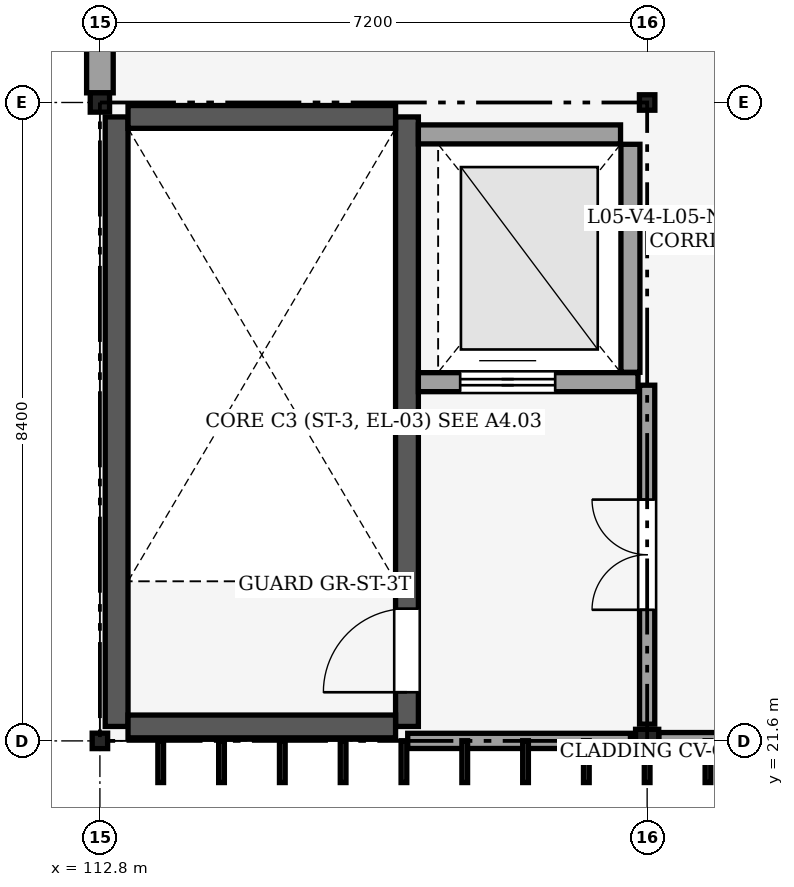
"""IFC4 building model, lengths in metres.
Left out: names, types, materials, properties, quantities, classifications, styles, units other than length and angle.
Written with IfcOpenShell. Run it as: python <this file> out.ifc"""

import sys

from ifc_helpers import new_model, si_unit, direction, frame, frame_2d, origin, origin_2d, place, context, subcontext, project, spatial, rectangle, hollow_rectangle, extrude, element, fill, save


model = new_model("IFC4")
c1 = context("Model", 3, precision=1e-05, world=origin(), true_north=direction((0.0, 1.0)))
c2 = subcontext(c1, "Body", "Model", "MODEL_VIEW")
j1 = project(units=[si_unit("LENGTHUNIT", "METRE"), si_unit("PLANEANGLEUNIT", "RADIAN")], contexts=[c1])
p1 = place(None, origin())
s1 = spatial("IfcSite", under=j1, at=p1, CompositionType="ELEMENT")
p2 = place(p1, origin())
s2 = spatial("IfcBuilding", under=s1, at=p2, CompositionType="ELEMENT")
p3 = place(p2, frame((0.0, 0.0, 24.6)))
s3 = spatial("IfcBuildingStorey", under=s2, at=p3, CompositionType="ELEMENT", Elevation=24.6)
p4 = place(p3, frame((112.8, 21.6, 0.0), z_axis=(0.0, 0.0, 1.0), x_axis=(1.0, 0.0, 0.0)))
e1 = element("IfcColumn", 1, at=p4, inside=s3, PredefinedType="COLUMN", context=c2, shape_type="SweptSolid", body=[
    extrude(hollow_rectangle(XDim=0.203, YDim=0.203, WallThickness=0.013, OuterFilletRadius=0.025, at=origin_2d()), origin(), (0.0, 0.0, 1.0), 4.8),
])
p5 = place(p3, frame((112.8, 30.0, 0.0), z_axis=(0.0, 0.0, 1.0), x_axis=(1.0, 0.0, 0.0)))
e2 = element("IfcColumn", 2, at=p5, inside=s3, PredefinedType="COLUMN", context=c2, shape_type="SweptSolid", body=[
    extrude(hollow_rectangle(XDim=0.254, YDim=0.254, WallThickness=0.013, OuterFilletRadius=0.025, at=origin_2d()), origin(), (0.0, 0.0, 1.0), 4.8),
])
p6 = place(p3, frame((120.0, 21.6, 0.0), z_axis=(0.0, 0.0, 1.0), x_axis=(1.0, 0.0, 0.0)))
e3 = element("IfcColumn", 3, at=p6, inside=s3, PredefinedType="COLUMN", context=c2, shape_type="SweptSolid", body=[
    extrude(hollow_rectangle(XDim=0.305, YDim=0.305, WallThickness=0.016, OuterFilletRadius=0.032, at=origin_2d()), origin(), (0.0, 0.0, 1.0), 4.8),
])
p7 = place(p3, frame((120.0, 30.0, 0.0), z_axis=(0.0, 0.0, 1.0), x_axis=(1.0, 0.0, 0.0)))
e4 = element("IfcColumn", 4, at=p7, inside=s3, PredefinedType="COLUMN", context=c2, shape_type="SweptSolid", body=[
    extrude(hollow_rectangle(XDim=0.203, YDim=0.203, WallThickness=0.013, OuterFilletRadius=0.025, at=origin_2d()), origin(), (0.0, 0.0, 1.0), 4.8),
])
p8 = place(p3, frame((127.098, 21.6, 0.0), z_axis=(0.0, 0.0, 1.0), x_axis=(-1.0, 0.0, 0.0)))
e5 = element("IfcWall", 5, at=p8, inside=s3, PredefinedType="SOLIDWALL", context=c2, shape_type="SweptSolid", body=[
    extrude(rectangle(XDim=6.946, YDim=0.22, at=frame_2d((3.473, 0.0))), origin(), (0.0, 0.0, 1.0), 3.695),
])
p9 = place(p8, frame((2.423, 0.0, 0.9)))
e6 = element("IfcOpeningElement", 6, at=p9, cuts=e5, PredefinedType="OPENING", context=c2, shape_type="SweptSolid", body=[
    extrude(rectangle(XDim=2.1, YDim=0.9, at=frame_2d((1.05, 0.45))), frame((0.0, 0.12, 0.0), z_axis=(0.0, -1.0, 0.0), x_axis=(1.0, 0.0, 0.0)), (0.0, 0.0, 1.0), 0.24),
])
p10 = place(p3, frame((112.8, 30.127, 0.0), z_axis=(0.0, 0.0, 1.0), x_axis=(0.0, 1.0, 0.0)))
e7 = element("IfcWall", 7, at=p10, inside=s3, PredefinedType="SOLIDWALL", context=c2, shape_type="SweptSolid", body=[
    extrude(rectangle(XDim=8.121, YDim=0.35, at=frame_2d((4.06, 0.0))), origin(), (0.0, 0.0, 1.0), 4.6),
])
p11 = place(p10, frame((0.75, 0.0, 0.9)))
e8 = element("IfcOpeningElement", 8, at=p11, cuts=e7, PredefinedType="OPENING", context=c2, shape_type="SweptSolid", body=[
    extrude(rectangle(XDim=1.2, YDim=1.5, at=frame_2d((0.6, 0.75))), frame((0.0, 0.185, 0.0), z_axis=(0.0, -1.0, 0.0), x_axis=(1.0, 0.0, 0.0)), (0.0, 0.0, 1.0), 0.371),
])
p12 = place(p3, frame((113.02, 21.79, 0.0), z_axis=(0.0, 0.0, 1.0), x_axis=(0.0, 1.0, 0.0)))
e9 = element("IfcWall", 9, at=p12, inside=s3, PredefinedType="SHEAR", context=c2, shape_type="SweptSolid", body=[
    extrude(rectangle(XDim=8.02, YDim=0.3, at=frame_2d((4.01, 0.0))), origin(), (0.0, 0.0, 1.0), 4.6),
])
p13 = place(p3, frame((116.84, 21.79, 0.0), z_axis=(0.0, 0.0, 1.0), x_axis=(0.0, 1.0, 0.0)))
e10 = element("IfcWall", 10, at=p13, inside=s3, PredefinedType="SHEAR", context=c2, shape_type="SweptSolid", body=[
    extrude(rectangle(XDim=8.02, YDim=0.3, at=frame_2d((4.01, 0.0))), origin(), (0.0, 0.0, 1.0), 4.6),
])
p14 = place(p13, frame((0.45, 0.0, 0.0)))
e11 = element("IfcOpeningElement", 11, at=p14, cuts=e10, PredefinedType="OPENING", context=c2, shape_type="SweptSolid", body=[
    extrude(rectangle(XDim=1.1, YDim=2.15, at=frame_2d((0.55, 1.075))), frame((0.0, 0.16, 0.0), z_axis=(0.0, -1.0, 0.0), x_axis=(1.0, 0.0, 0.0)), (0.0, 0.0, 1.0), 0.321),
])
for number, where, z_axis, x_axis in (
    (12, (113.17, 21.79, 0.0), (0.0, 0.0, 1.0), (1.0, 0.0, 0.0)),
    (13, (113.17, 29.81, 0.0), (0.0, 0.0, 1.0), (1.0, 0.0, 0.0)),
):
    element("IfcWall", number, at=place(p3, frame(where, z_axis=z_axis, x_axis=x_axis)), inside=s3, PredefinedType="SHEAR", context=c2, shape_type="SweptSolid", body=[
        extrude(rectangle(XDim=3.52, YDim=0.3, at=frame_2d((1.76, 0.0))), origin(), (0.0, 0.0, 1.0), 4.6),
    ])
p15 = place(p3, frame((116.99, 29.58, 0.0), z_axis=(0.0, 0.0, 1.0), x_axis=(1.0, 0.0, 0.0)))
e14 = element("IfcWall", 14, at=p15, inside=s3, PredefinedType="PARTITIONING", context=c2, shape_type="SweptSolid", body=[
    extrude(rectangle(XDim=2.66, YDim=0.25, at=frame_2d((1.33, 0.0))), origin(), (0.0, 0.0, 1.0), 4.6),
])
p16 = place(p3, frame((119.78, 26.45, 0.0), z_axis=(0.0, 0.0, 1.0), x_axis=(0.0, 1.0, 0.0)))
e15 = element("IfcWall", 15, at=p16, inside=s3, PredefinedType="PARTITIONING", context=c2, shape_type="SweptSolid", body=[
    extrude(rectangle(XDim=3.0, YDim=0.25, at=frame_2d((1.5, 0.0))), origin(), (0.0, 0.0, 1.0), 4.6),
])
p17 = place(p3, frame((116.99, 26.32, 0.0), z_axis=(0.0, 0.0, 1.0), x_axis=(1.0, 0.0, 0.0)))
e16 = element("IfcWall", 16, at=p17, inside=s3, PredefinedType="PARTITIONING", context=c2, shape_type="SweptSolid", body=[
    extrude(rectangle(XDim=2.89, YDim=0.25, at=frame_2d((1.445, 0.0))), origin(), (0.0, 0.0, 1.0), 4.6),
])
p18 = place(p17, frame((0.55, 0.0, 0.0)))
e17 = element("IfcOpeningElement", 17, at=p18, cuts=e16, PredefinedType="OPENING", context=c2, shape_type="SweptSolid", body=[
    extrude(rectangle(XDim=1.25, YDim=2.15, at=frame_2d((0.625, 1.075))), frame((0.0, 0.135, 0.0), z_axis=(0.0, -1.0, 0.0), x_axis=(1.0, 0.0, 0.0)), (0.0, 0.0, 1.0), 0.271),
])
p19 = place(p3, frame((116.85, 21.6, 0.0), z_axis=(0.0, 0.0, 1.0), x_axis=(1.0, 0.0, 0.0)))
e18 = element("IfcWall", 18, at=p19, inside=s3, PredefinedType="PARTITIONING", context=c2, shape_type="SweptSolid", body=[
    extrude(rectangle(XDim=2.93, YDim=0.2, at=frame_2d((1.465, 0.0))), origin(), (0.0, 0.0, 1.0), 3.695),
])
p20 = place(p3, frame((120.0, 21.82, 0.0), z_axis=(0.0, 0.0, 1.0), x_axis=(0.0, 1.0, 0.0)))
e19 = element("IfcWall", 19, at=p20, inside=s3, PredefinedType="PARTITIONING", context=c2, shape_type="SweptSolid", body=[
    extrude(rectangle(XDim=4.46, YDim=0.2, at=frame_2d((2.23, 0.0))), origin(), (0.0, 0.0, 1.0), 4.6),
])
p21 = place(p20, frame((1.505, 0.0, 0.0)))
e20 = element("IfcOpeningElement", 20, at=p21, cuts=e19, PredefinedType="OPENING", context=c2, shape_type="SweptSolid", body=[
    extrude(rectangle(XDim=1.45, YDim=2.2, at=frame_2d((0.725, 1.1))), frame((0.0, 0.11, 0.0), z_axis=(0.0, -1.0, 0.0), x_axis=(1.0, 0.0, 0.0)), (0.0, 0.0, 1.0), 0.22),
])
p22 = place(p14, origin())
e21 = element("IfcDoor", 21, at=p22, inside=s3, OperationType="SINGLE_SWING_LEFT", PredefinedType="DOOR", context=c2, shape_type="SweptSolid", body=[
    extrude(rectangle(XDim=1.1, YDim=2.15, at=frame_2d((0.55, 1.075))), frame((0.0, 0.025, 0.0), z_axis=(0.0, -1.0, 0.0), x_axis=(1.0, 0.0, 0.0)), (0.0, 0.0, 1.0), 0.05),
])
fill(e11, e21)
p23 = place(p18, origin())
e22 = element("IfcDoor", 22, at=p23, inside=s3, OperationType="DOUBLE_DOOR_SLIDING", PredefinedType="DOOR", context=c2, shape_type="SweptSolid", body=[
    extrude(rectangle(XDim=1.25, YDim=2.15, at=frame_2d((0.625, 1.075))), frame((0.0, 0.025, 0.0), z_axis=(0.0, -1.0, 0.0), x_axis=(1.0, 0.0, 0.0)), (0.0, 0.0, 1.0), 0.05),
])
fill(e17, e22)
p24 = place(p21, origin())
e23 = element("IfcDoor", 23, at=p24, inside=s3, OperationType="DOUBLE_DOOR_SINGLE_SWING", PredefinedType="DOOR", context=c2, shape_type="SweptSolid", body=[
    extrude(rectangle(XDim=1.45, YDim=2.2, at=frame_2d((0.725, 1.1))), frame((0.0, 0.025, 0.0), z_axis=(0.0, -1.0, 0.0), x_axis=(1.0, 0.0, 0.0)), (0.0, 0.0, 1.0), 0.05),
])
fill(e20, e23)
save(model, sys.argv[1])
